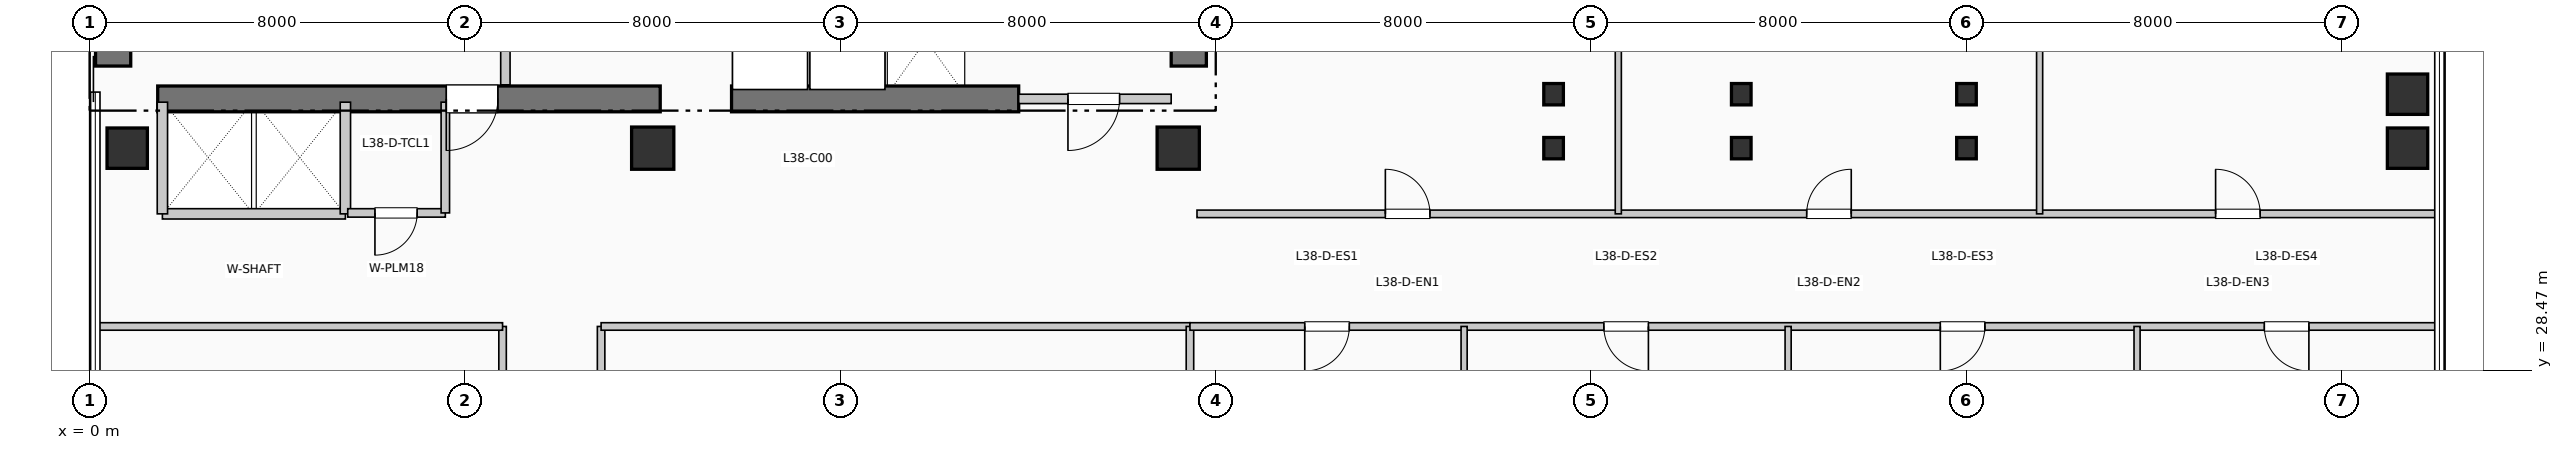
"""IFC4 building model, lengths in metres.
Left out: names, types, materials, properties, quantities, classifications, styles, units other than length and angle.
Written with IfcOpenShell. Run it as: python <this file> out.ifc"""

import sys

from ifc_helpers import new_model, si_unit, direction, frame, frame_2d, origin, origin_2d, place, context, subcontext, project, spatial, rectangle, i_section, extrude, element, fill, save


model = new_model("IFC4")
c1 = context("Model", 3, precision=1e-05, world=origin(), true_north=direction((0.0, 1.0)))
c2 = subcontext(c1, "Body", "Model", "MODEL_VIEW")
j1 = project(units=[si_unit("LENGTHUNIT", "METRE"), si_unit("PLANEANGLEUNIT", "RADIAN")], contexts=[c1])
p1 = place(None, origin())
s1 = spatial("IfcSite", under=j1, at=p1, CompositionType="ELEMENT")
p2 = place(p1, origin())
s2 = spatial("IfcBuilding", under=s1, at=p2, CompositionType="ELEMENT")
p3 = place(p2, frame((0.0, 0.0, 158.73)))
s3 = spatial("IfcBuildingStorey", under=s2, at=p3, CompositionType="ELEMENT", Elevation=158.73)
p4 = place(p3, frame((0.5, 34.95, 0.0), z_axis=(0.0, 0.0, 1.0), x_axis=(0.0, 1.0, 0.0)))
e1 = element("IfcWall", 1, at=p4, inside=s3, PredefinedType="SHEAR", context=c2, shape_type="SweptSolid", body=[
    extrude(rectangle(XDim=7.9, YDim=0.75, at=frame_2d((3.95, 0.0))), origin(), (0.0, 0.0, 1.0), 3.96),
])
p5 = place(p3, frame((23.425, 34.95, 0.0), z_axis=(0.0, 0.0, 1.0), x_axis=(0.0, 1.0, 0.0)))
e2 = element("IfcWall", 2, at=p5, inside=s3, PredefinedType="SHEAR", context=c2, shape_type="SweptSolid", body=[
    extrude(rectangle(XDim=10.64, YDim=0.75, at=frame_2d((5.32, 0.0))), origin(), (0.0, 0.0, 1.0), 3.96),
])
p6 = place(p3, frame((1.45, 34.25, 0.0), z_axis=(0.0, 0.0, 1.0), x_axis=(1.0, 0.0, 0.0)))
e3 = element("IfcWall", 3, at=p6, inside=s3, PredefinedType="SHEAR", context=c2, shape_type="SweptSolid", body=[
    extrude(rectangle(XDim=10.71, YDim=0.55, at=frame_2d((5.355, 0.0))), origin(), (0.0, 0.0, 1.0), 3.96),
])
p7 = place(p6, frame((7.25, 0.0, 0.0), z_axis=(0.0, 0.0, 1.0), x_axis=(-1.0, 0.0, 0.0)))
e4 = element("IfcOpeningElement", 4, at=p7, cuts=e3, PredefinedType="OPENING", context=c2, shape_type="SweptSolid", body=[
    extrude(rectangle(XDim=1.1, YDim=2.15, at=frame_2d((0.55, 1.075))), frame((0.0, 0.285, 0.0), z_axis=(0.0, -1.0, 0.0), x_axis=(1.0, 0.0, 0.0)), (0.0, 0.0, 1.0), 0.57),
])
p8 = place(p3, frame((13.68, 34.25, 0.0), z_axis=(0.0, 0.0, 1.0), x_axis=(1.0, 0.0, 0.0)))
e5 = element("IfcWall", 5, at=p8, inside=s3, PredefinedType="SHEAR", context=c2, shape_type="SweptSolid", body=[
    extrude(rectangle(XDim=6.12, YDim=0.55, at=frame_2d((3.06, 0.0))), origin(), (0.0, 0.0, 1.0), 3.96),
])
p9 = place(p3, frame((0.8, 33.2, 0.0), z_axis=(0.0, 0.0, 1.0), x_axis=(1.0, 0.0, 0.0)))
e6 = element("IfcColumn", 6, at=p9, inside=s3, PredefinedType="COLUMN", context=c2, shape_type="SweptSolid", body=[
    extrude(rectangle(XDim=0.86, YDim=0.86, at=origin_2d()), origin(), (0.0, 0.0, 1.0), 3.96),
])
for number, where, z_axis, x_axis in (
    (7, (12.0, 33.2, 0.0), (0.0, 0.0, 1.0), (1.0, 0.0, 0.0)),
    (8, (23.2, 33.2, 0.0), (0.0, 0.0, 1.0), (1.0, 0.0, 0.0)),
):
    element("IfcColumn", number, at=place(p3, frame(where, z_axis=z_axis, x_axis=x_axis)), inside=s3, PredefinedType="COLUMN", context=c2, shape_type="SweptSolid", body=[
        extrude(rectangle(XDim=0.9, YDim=0.9, at=origin_2d()), origin(), (0.0, 0.0, 1.0), 3.96),
    ])
for number, where, z_axis, x_axis in (
    (9, (31.2, 33.2, 0.0), (0.0, 0.0, 1.0), (1.0, 0.0, 0.0)),
    (10, (31.2, 34.35, 0.0), (0.0, 0.0, 1.0), (1.0, 0.0, 0.0)),
    (11, (35.2, 33.2, 0.0), (0.0, 0.0, 1.0), (1.0, 0.0, 0.0)),
    (12, (35.2, 34.35, 0.0), (0.0, 0.0, 1.0), (1.0, 0.0, 0.0)),
    (13, (40.0, 33.2, 0.0), (0.0, 0.0, 1.0), (1.0, 0.0, 0.0)),
    (14, (40.0, 34.35, 0.0), (0.0, 0.0, 1.0), (1.0, 0.0, 0.0)),
):
    element("IfcColumn", number, at=place(p3, frame(where, z_axis=z_axis, x_axis=x_axis)), inside=s3, PredefinedType="COLUMN", context=c2, shape_type="SweptSolid", body=[
        extrude(i_section(OverallWidth=0.418, OverallDepth=0.455, WebThickness=0.032, FlangeThickness=0.051, at=origin_2d()), origin(), (0.0, 0.0, 1.0), 3.96),
    ])
for number, where, z_axis, x_axis in (
    (15, (49.4, 33.2, 0.0), (0.0, 0.0, 1.0), (1.0, 0.0, 0.0)),
    (16, (49.4, 34.35, 0.0), (0.0, 0.0, 1.0), (1.0, 0.0, 0.0)),
):
    element("IfcColumn", number, at=place(p3, frame(where, z_axis=z_axis, x_axis=x_axis)), inside=s3, PredefinedType="COLUMN", context=c2, shape_type="SweptSolid", body=[
        extrude(rectangle(XDim=0.86, YDim=0.86, at=origin_2d()), origin(), (0.0, 0.0, 1.0), 3.96),
    ])
p10 = place(p3, frame((8.86, 34.55, 0.0), z_axis=(0.0, 0.0, 1.0), x_axis=(0.0, 1.0, 0.0)))
e17 = element("IfcWall", 17, at=p10, inside=s3, PredefinedType="PARTITIONING", context=c2, shape_type="SweptSolid", body=[
    extrude(rectangle(XDim=2.5, YDim=0.2, at=frame_2d((1.25, 0.0))), origin(), (0.0, 0.0, 1.0), 3.71),
])
p11 = place(p3, frame((19.8, 34.25, 0.0), z_axis=(0.0, 0.0, 1.0), x_axis=(1.0, 0.0, 0.0)))
e18 = element("IfcWall", 18, at=p11, inside=s3, PredefinedType="PARTITIONING", context=c2, shape_type="SweptSolid", body=[
    extrude(rectangle(XDim=3.25, YDim=0.2, at=frame_2d((1.625, 0.0))), origin(), (0.0, 0.0, 1.0), 3.71),
])
p12 = place(p11, frame((2.15, 0.0, 0.0), z_axis=(0.0, 0.0, 1.0), x_axis=(-1.0, 0.0, 0.0)))
e19 = element("IfcOpeningElement", 19, at=p12, cuts=e18, PredefinedType="OPENING", context=c2, shape_type="SweptSolid", body=[
    extrude(rectangle(XDim=1.1, YDim=2.15, at=frame_2d((0.55, 1.075))), frame((0.0, 0.11, 0.0), z_axis=(0.0, -1.0, 0.0), x_axis=(1.0, 0.0, 0.0)), (0.0, 0.0, 1.0), 0.22),
])
p13 = place(p3, frame((1.55, 31.8, 0.0), z_axis=(0.0, 0.0, 1.0), x_axis=(1.0, 0.0, 0.0)))
e20 = element("IfcWall", 20, at=p13, inside=s3, PredefinedType="PARTITIONING", context=c2, shape_type="SweptSolid", body=[
    extrude(rectangle(XDim=3.9, YDim=0.22, at=frame_2d((1.95, 0.0))), origin(), (0.0, 0.0, 1.0), 3.71),
])
for number, where, z_axis, x_axis in (
    (21, (1.55, 31.8, 0.0), (0.0, 0.0, 1.0), (0.0, 1.0, 0.0)),
    (22, (5.45, 31.8, 0.0), (0.0, 0.0, 1.0), (0.0, 1.0, 0.0)),
):
    element("IfcWall", number, at=place(p3, frame(where, z_axis=z_axis, x_axis=x_axis)), inside=s3, PredefinedType="PARTITIONING", context=c2, shape_type="SweptSolid", body=[
        extrude(rectangle(XDim=2.38, YDim=0.22, at=frame_2d((1.19, 0.0))), origin(), (0.0, 0.0, 1.0), 3.71),
    ])
p14 = place(p3, frame((5.5, 31.82, 0.0), z_axis=(0.0, 0.0, 1.0), x_axis=(1.0, 0.0, 0.0)))
e23 = element("IfcWall", 23, at=p14, inside=s3, PredefinedType="PLUMBINGWALL", context=c2, shape_type="SweptSolid", body=[
    extrude(rectangle(XDim=2.08, YDim=0.18, at=frame_2d((1.04, 0.0))), origin(), (0.0, 0.0, 1.0), 3.71),
])
p15 = place(p14, frame((1.48, 0.0, 0.0), z_axis=(0.0, 0.0, 1.0), x_axis=(-1.0, 0.0, 0.0)))
e24 = element("IfcOpeningElement", 24, at=p15, cuts=e23, PredefinedType="OPENING", context=c2, shape_type="SweptSolid", body=[
    extrude(rectangle(XDim=0.9, YDim=2.1, at=frame_2d((0.45, 1.05))), frame((0.0, 0.1, 0.0), z_axis=(0.0, -1.0, 0.0), x_axis=(1.0, 0.0, 0.0)), (0.0, 0.0, 1.0), 0.2),
])
p16 = place(p3, frame((7.58, 31.82, 0.0), z_axis=(0.0, 0.0, 1.0), x_axis=(0.0, 1.0, 0.0)))
e25 = element("IfcWall", 25, at=p16, inside=s3, PredefinedType="PLUMBINGWALL", context=c2, shape_type="SweptSolid", body=[
    extrude(rectangle(XDim=2.36, YDim=0.18, at=frame_2d((1.18, 0.0))), origin(), (0.0, 0.0, 1.0), 3.71),
])
p17 = place(p3, frame((8.8, 4.39, 0.0), z_axis=(0.0, 0.0, 1.0), x_axis=(0.0, 1.0, 0.0)))
e26 = element("IfcWall", 26, at=p17, inside=s3, PredefinedType="PARTITIONING", context=c2, shape_type="SweptSolid", body=[
    extrude(rectangle(XDim=25.01, YDim=0.16, at=frame_2d((12.505, 0.0))), origin(), (0.0, 0.0, 1.0), 3.71),
])
p18 = place(p17, frame((3.976, 0.0, 0.0), z_axis=(0.0, 0.0, 1.0), x_axis=(-1.0, 0.0, 0.0)))
e27 = element("IfcOpeningElement", 27, at=p18, cuts=e26, PredefinedType="OPENING", context=c2, shape_type="SweptSolid", body=[
    extrude(rectangle(XDim=0.95, YDim=2.15, at=frame_2d((0.475, 1.075))), frame((0.0, 0.09, 0.0), z_axis=(0.0, -1.0, 0.0), x_axis=(1.0, 0.0, 0.0)), (0.0, 0.0, 1.0), 0.18),
])
p19 = place(p17, frame((11.229, 0.0, 0.0), z_axis=(0.0, 0.0, 1.0), x_axis=(-1.0, 0.0, 0.0)))
e28 = element("IfcOpeningElement", 28, at=p19, cuts=e26, PredefinedType="OPENING", context=c2, shape_type="SweptSolid", body=[
    extrude(rectangle(XDim=0.95, YDim=2.15, at=frame_2d((0.475, 1.075))), frame((0.0, 0.09, 0.0), z_axis=(0.0, -1.0, 0.0), x_axis=(1.0, 0.0, 0.0)), (0.0, 0.0, 1.0), 0.18),
])
p20 = place(p17, frame((20.233, 0.0, 0.0), z_axis=(0.0, 0.0, 1.0), x_axis=(-1.0, 0.0, 0.0)))
e29 = element("IfcOpeningElement", 29, at=p20, cuts=e26, PredefinedType="OPENING", context=c2, shape_type="SweptSolid", body=[
    extrude(rectangle(XDim=0.95, YDim=2.15, at=frame_2d((0.475, 1.075))), frame((0.0, 0.09, 0.0), z_axis=(0.0, -1.0, 0.0), x_axis=(1.0, 0.0, 0.0)), (0.0, 0.0, 1.0), 0.18),
])
p21 = place(p3, frame((10.9, 4.39, 0.0), z_axis=(0.0, 0.0, 1.0), x_axis=(0.0, 1.0, 0.0)))
e30 = element("IfcWall", 30, at=p21, inside=s3, PredefinedType="PARTITIONING", context=c2, shape_type="SweptSolid", body=[
    extrude(rectangle(XDim=25.01, YDim=0.16, at=frame_2d((12.505, 0.0))), origin(), (0.0, 0.0, 1.0), 3.71),
])
p22 = place(p21, frame((6.028, 0.0, 0.0)))
e31 = element("IfcOpeningElement", 31, at=p22, cuts=e30, PredefinedType="OPENING", context=c2, shape_type="SweptSolid", body=[
    extrude(rectangle(XDim=0.95, YDim=2.15, at=frame_2d((0.475, 1.075))), frame((0.0, 0.09, 0.0), z_axis=(0.0, -1.0, 0.0), x_axis=(1.0, 0.0, 0.0)), (0.0, 0.0, 1.0), 0.18),
])
p23 = place(p21, frame((19.533, 0.0, 0.0)))
e32 = element("IfcOpeningElement", 32, at=p23, cuts=e30, PredefinedType="OPENING", context=c2, shape_type="SweptSolid", body=[
    extrude(rectangle(XDim=0.95, YDim=2.15, at=frame_2d((0.475, 1.075))), frame((0.0, 0.09, 0.0), z_axis=(0.0, -1.0, 0.0), x_axis=(1.0, 0.0, 0.0)), (0.0, 0.0, 1.0), 0.18),
])
p24 = place(p3, frame((0.19, 29.4, 0.0), z_axis=(0.0, 0.0, 1.0), x_axis=(1.0, 0.0, 0.0)))
e33 = element("IfcWall", 33, at=p24, inside=s3, PredefinedType="PARTITIONING", context=c2, shape_type="SweptSolid", body=[
    extrude(rectangle(XDim=8.61, YDim=0.16, at=frame_2d((4.305, 0.0))), origin(), (0.0, 0.0, 1.0), 3.365),
])
p25 = place(p3, frame((10.9, 29.4, 0.0), z_axis=(0.0, 0.0, 1.0), x_axis=(1.0, 0.0, 0.0)))
e34 = element("IfcWall", 34, at=p25, inside=s3, PredefinedType="PARTITIONING", context=c2, shape_type="SweptSolid", body=[
    extrude(rectangle(XDim=12.55, YDim=0.16, at=frame_2d((6.275, 0.0))), origin(), (0.0, 0.0, 1.0), 3.365),
])
p26 = place(p3, frame((23.45, 0.19, 0.0), z_axis=(0.0, 0.0, 1.0), x_axis=(0.0, 1.0, 0.0)))
e35 = element("IfcWall", 35, at=p26, inside=s3, PredefinedType="PARTITIONING", context=c2, shape_type="SweptSolid", body=[
    extrude(rectangle(XDim=29.21, YDim=0.16, at=frame_2d((14.605, 0.0))), origin(), (0.0, 0.0, 1.0), 3.045),
])
p27 = place(p3, frame((23.45, 29.4, 0.0), z_axis=(0.0, 0.0, 1.0), x_axis=(1.0, 0.0, 0.0)))
e36 = element("IfcWall", 36, at=p27, inside=s3, PredefinedType="PARTITIONING", context=c2, shape_type="SweptSolid", body=[
    extrude(rectangle(XDim=26.56, YDim=0.16, at=frame_2d((13.28, 0.0))), origin(), (0.0, 0.0, 1.0), 3.365),
])
p28 = place(p27, frame((3.396, 0.0, 0.0), z_axis=(0.0, 0.0, 1.0), x_axis=(-1.0, 0.0, 0.0)))
e37 = element("IfcOpeningElement", 37, at=p28, cuts=e36, PredefinedType="OPENING", context=c2, shape_type="SweptSolid", body=[
    extrude(rectangle(XDim=0.95, YDim=2.15, at=frame_2d((0.475, 1.075))), frame((0.0, 0.09, 0.0), z_axis=(0.0, -1.0, 0.0), x_axis=(1.0, 0.0, 0.0)), (0.0, 0.0, 1.0), 0.18),
])
p29 = place(p27, frame((9.771, 0.0, 0.0), z_axis=(0.0, 0.0, 1.0), x_axis=(-1.0, 0.0, 0.0)))
e38 = element("IfcOpeningElement", 38, at=p29, cuts=e36, PredefinedType="OPENING", context=c2, shape_type="SweptSolid", body=[
    extrude(rectangle(XDim=0.95, YDim=2.15, at=frame_2d((0.475, 1.075))), frame((0.0, 0.09, 0.0), z_axis=(0.0, -1.0, 0.0), x_axis=(1.0, 0.0, 0.0)), (0.0, 0.0, 1.0), 0.18),
])
p30 = place(p27, frame((16.942, 0.0, 0.0), z_axis=(0.0, 0.0, 1.0), x_axis=(-1.0, 0.0, 0.0)))
e39 = element("IfcOpeningElement", 39, at=p30, cuts=e36, PredefinedType="OPENING", context=c2, shape_type="SweptSolid", body=[
    extrude(rectangle(XDim=0.95, YDim=2.15, at=frame_2d((0.475, 1.075))), frame((0.0, 0.09, 0.0), z_axis=(0.0, -1.0, 0.0), x_axis=(1.0, 0.0, 0.0)), (0.0, 0.0, 1.0), 0.18),
])
p31 = place(p27, frame((23.848, 0.0, 0.0), z_axis=(0.0, 0.0, 1.0), x_axis=(-1.0, 0.0, 0.0)))
e40 = element("IfcOpeningElement", 40, at=p31, cuts=e36, PredefinedType="OPENING", context=c2, shape_type="SweptSolid", body=[
    extrude(rectangle(XDim=0.95, YDim=2.15, at=frame_2d((0.475, 1.075))), frame((0.0, 0.09, 0.0), z_axis=(0.0, -1.0, 0.0), x_axis=(1.0, 0.0, 0.0)), (0.0, 0.0, 1.0), 0.18),
])
p32 = place(p3, frame((23.6, 31.8, 0.0), z_axis=(0.0, 0.0, 1.0), x_axis=(1.0, 0.0, 0.0)))
e41 = element("IfcWall", 41, at=p32, inside=s3, PredefinedType="PARTITIONING", context=c2, shape_type="SweptSolid", body=[
    extrude(rectangle(XDim=26.41, YDim=0.16, at=frame_2d((13.205, 0.0))), origin(), (0.0, 0.0, 1.0), 3.71),
])
p33 = place(p32, frame((4.015, 0.0, 0.0)))
e42 = element("IfcOpeningElement", 42, at=p33, cuts=e41, PredefinedType="OPENING", context=c2, shape_type="SweptSolid", body=[
    extrude(rectangle(XDim=0.95, YDim=2.15, at=frame_2d((0.475, 1.075))), frame((0.0, 0.09, 0.0), z_axis=(0.0, -1.0, 0.0), x_axis=(1.0, 0.0, 0.0)), (0.0, 0.0, 1.0), 0.18),
])
p34 = place(p32, frame((12.994, 0.0, 0.0)))
e43 = element("IfcOpeningElement", 43, at=p34, cuts=e41, PredefinedType="OPENING", context=c2, shape_type="SweptSolid", body=[
    extrude(rectangle(XDim=0.95, YDim=2.15, at=frame_2d((0.475, 1.075))), frame((0.0, 0.09, 0.0), z_axis=(0.0, -1.0, 0.0), x_axis=(1.0, 0.0, 0.0)), (0.0, 0.0, 1.0), 0.18),
])
p35 = place(p32, frame((21.709, 0.0, 0.0)))
e44 = element("IfcOpeningElement", 44, at=p35, cuts=e41, PredefinedType="OPENING", context=c2, shape_type="SweptSolid", body=[
    extrude(rectangle(XDim=0.95, YDim=2.15, at=frame_2d((0.475, 1.075))), frame((0.0, 0.09, 0.0), z_axis=(0.0, -1.0, 0.0), x_axis=(1.0, 0.0, 0.0)), (0.0, 0.0, 1.0), 0.18),
])
for number, where, z_axis, x_axis in (
    (45, (29.293, 22.19, 0.0), (0.0, 0.0, 1.0), (0.0, 1.0, 0.0)),
    (46, (36.199, 22.19, 0.0), (0.0, 0.0, 1.0), (0.0, 1.0, 0.0)),
    (47, (43.635, 22.19, 0.0), (0.0, 0.0, 1.0), (0.0, 1.0, 0.0)),
):
    element("IfcWall", number, at=place(p3, frame(where, z_axis=z_axis, x_axis=x_axis)), inside=s3, PredefinedType="PARTITIONING", context=c2, shape_type="SweptSolid", body=[
        extrude(rectangle(XDim=7.21, YDim=0.13, at=frame_2d((3.605, 0.0))), origin(), (0.0, 0.0, 1.0), 3.71),
    ])
for number, where, z_axis, x_axis in (
    (48, (32.579, 31.8, 0.0), (0.0, 0.0, 1.0), (0.0, 1.0, 0.0)),
    (49, (41.559, 31.8, 0.0), (0.0, 0.0, 1.0), (0.0, 1.0, 0.0)),
):
    element("IfcWall", number, at=place(p3, frame(where, z_axis=z_axis, x_axis=x_axis)), inside=s3, PredefinedType="PARTITIONING", context=c2, shape_type="SweptSolid", body=[
        extrude(rectangle(XDim=14.01, YDim=0.13, at=frame_2d((7.005, 0.0))), origin(), (0.0, 0.0, 1.0), 3.71),
    ])
p36 = place(p7, origin())
e50 = element("IfcDoor", 50, at=p36, inside=s3, OperationType="SINGLE_SWING_LEFT", PredefinedType="DOOR", context=c2, shape_type="SweptSolid", body=[
    extrude(rectangle(XDim=1.1, YDim=2.15, at=frame_2d((0.55, 1.075))), frame((0.0, 0.025, 0.0), z_axis=(0.0, -1.0, 0.0), x_axis=(1.0, 0.0, 0.0)), (0.0, 0.0, 1.0), 0.05),
])
fill(e4, e50)
p37 = place(p12, origin())
e51 = element("IfcDoor", 51, at=p37, inside=s3, OperationType="SINGLE_SWING_LEFT", PredefinedType="DOOR", context=c2, shape_type="SweptSolid", body=[
    extrude(rectangle(XDim=1.1, YDim=2.15, at=frame_2d((0.55, 1.075))), frame((0.0, 0.025, 0.0), z_axis=(0.0, -1.0, 0.0), x_axis=(1.0, 0.0, 0.0)), (0.0, 0.0, 1.0), 0.05),
])
fill(e19, e51)
p38 = place(p15, origin())
e52 = element("IfcDoor", 52, at=p38, inside=s3, OperationType="SINGLE_SWING_LEFT", PredefinedType="DOOR", context=c2, shape_type="SweptSolid", body=[
    extrude(rectangle(XDim=0.9, YDim=2.1, at=frame_2d((0.45, 1.05))), frame((0.0, 0.025, 0.0), z_axis=(0.0, -1.0, 0.0), x_axis=(1.0, 0.0, 0.0)), (0.0, 0.0, 1.0), 0.05),
])
fill(e24, e52)
p39 = place(p28, origin())
e53 = element("IfcDoor", 53, at=p39, inside=s3, OperationType="SINGLE_SWING_LEFT", PredefinedType="DOOR", context=c2, shape_type="SweptSolid", body=[
    extrude(rectangle(XDim=0.95, YDim=2.15, at=frame_2d((0.475, 1.075))), frame((0.0, 0.025, 0.0), z_axis=(0.0, -1.0, 0.0), x_axis=(1.0, 0.0, 0.0)), (0.0, 0.0, 1.0), 0.05),
])
fill(e37, e53)
p40 = place(p29, origin())
e54 = element("IfcDoor", 54, at=p40, inside=s3, OperationType="SINGLE_SWING_RIGHT", PredefinedType="DOOR", context=c2, shape_type="SweptSolid", body=[
    extrude(rectangle(XDim=0.95, YDim=2.15, at=frame_2d((0.475, 1.075))), frame((0.0, 0.025, 0.0), z_axis=(0.0, -1.0, 0.0), x_axis=(1.0, 0.0, 0.0)), (0.0, 0.0, 1.0), 0.05),
])
fill(e38, e54)
p41 = place(p30, origin())
e55 = element("IfcDoor", 55, at=p41, inside=s3, OperationType="SINGLE_SWING_LEFT", PredefinedType="DOOR", context=c2, shape_type="SweptSolid", body=[
    extrude(rectangle(XDim=0.95, YDim=2.15, at=frame_2d((0.475, 1.075))), frame((0.0, 0.025, 0.0), z_axis=(0.0, -1.0, 0.0), x_axis=(1.0, 0.0, 0.0)), (0.0, 0.0, 1.0), 0.05),
])
fill(e39, e55)
p42 = place(p31, origin())
e56 = element("IfcDoor", 56, at=p42, inside=s3, OperationType="SINGLE_SWING_RIGHT", PredefinedType="DOOR", context=c2, shape_type="SweptSolid", body=[
    extrude(rectangle(XDim=0.95, YDim=2.15, at=frame_2d((0.475, 1.075))), frame((0.0, 0.025, 0.0), z_axis=(0.0, -1.0, 0.0), x_axis=(1.0, 0.0, 0.0)), (0.0, 0.0, 1.0), 0.05),
])
fill(e40, e56)
p43 = place(p33, origin())
e57 = element("IfcDoor", 57, at=p43, inside=s3, OperationType="SINGLE_SWING_LEFT", PredefinedType="DOOR", context=c2, shape_type="SweptSolid", body=[
    extrude(rectangle(XDim=0.95, YDim=2.15, at=frame_2d((0.475, 1.075))), frame((0.0, 0.025, 0.0), z_axis=(0.0, -1.0, 0.0), x_axis=(1.0, 0.0, 0.0)), (0.0, 0.0, 1.0), 0.05),
])
fill(e42, e57)
p44 = place(p34, origin())
e58 = element("IfcDoor", 58, at=p44, inside=s3, OperationType="SINGLE_SWING_RIGHT", PredefinedType="DOOR", context=c2, shape_type="SweptSolid", body=[
    extrude(rectangle(XDim=0.95, YDim=2.15, at=frame_2d((0.475, 1.075))), frame((0.0, 0.025, 0.0), z_axis=(0.0, -1.0, 0.0), x_axis=(1.0, 0.0, 0.0)), (0.0, 0.0, 1.0), 0.05),
])
fill(e43, e58)
p45 = place(p35, origin())
e59 = element("IfcDoor", 59, at=p45, inside=s3, OperationType="SINGLE_SWING_LEFT", PredefinedType="DOOR", context=c2, shape_type="SweptSolid", body=[
    extrude(rectangle(XDim=0.95, YDim=2.15, at=frame_2d((0.475, 1.075))), frame((0.0, 0.025, 0.0), z_axis=(0.0, -1.0, 0.0), x_axis=(1.0, 0.0, 0.0)), (0.0, 0.0, 1.0), 0.05),
])
fill(e44, e59)
save(model, sys.argv[1])
